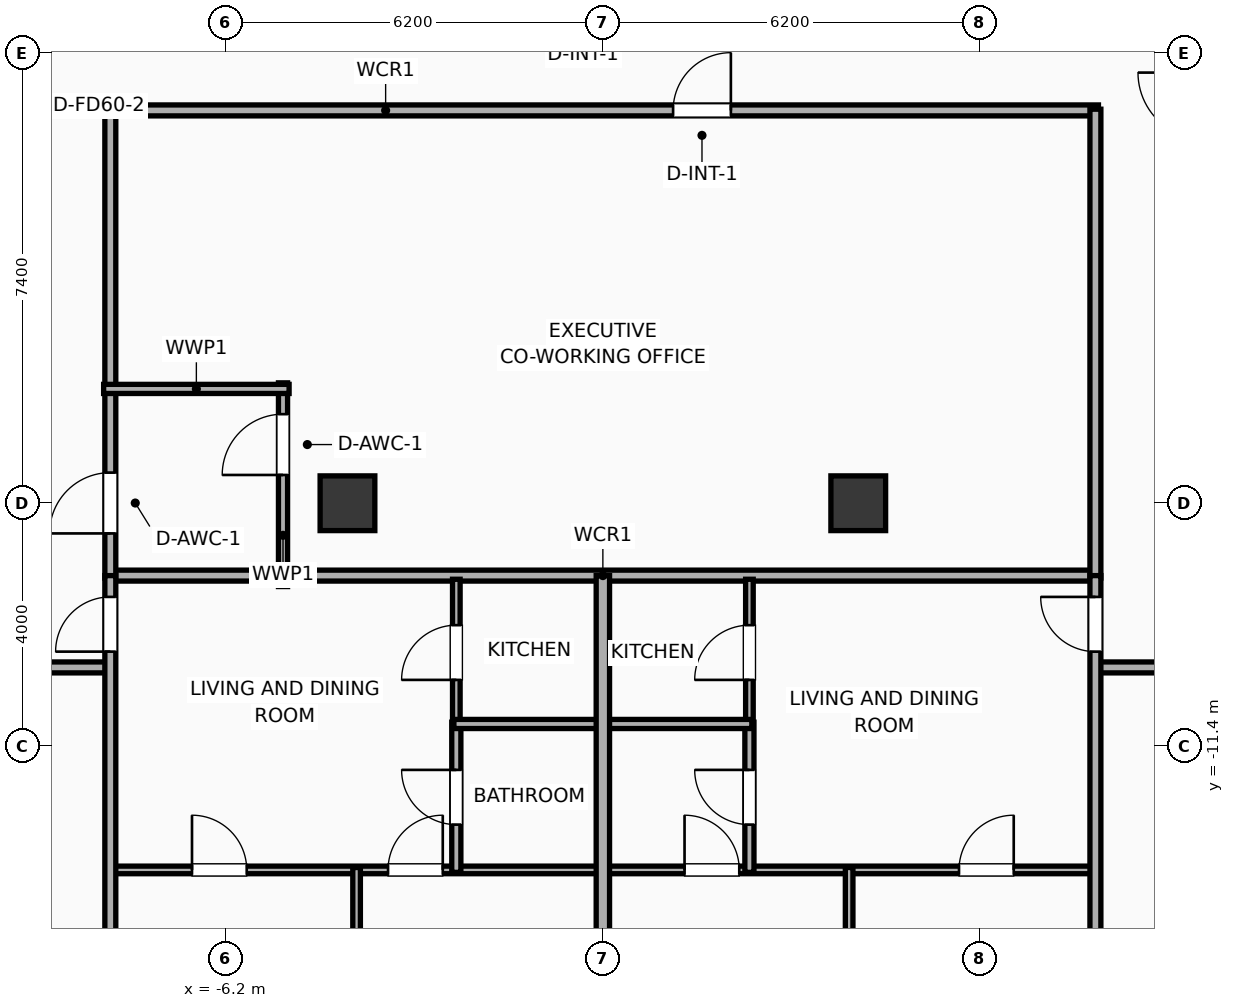
"""IFC4 building model, lengths in metres.
Left out: names, types, materials, properties, quantities, classifications, styles, units other than length and angle.
Written with IfcOpenShell. Run it as: python <this file> out.ifc"""

import sys

from ifc_helpers import new_model, si_unit, direction, frame, frame_2d, origin, origin_2d, place, context, subcontext, project, spatial, rectangle, extrude, element, fill, save


model = new_model("IFC4")
c1 = context("Model", 3, precision=1e-05, world=origin(), true_north=direction((0.0, 1.0)))
c2 = subcontext(c1, "Body", "Model", "MODEL_VIEW")
j1 = project(units=[si_unit("LENGTHUNIT", "METRE"), si_unit("PLANEANGLEUNIT", "RADIAN")], contexts=[c1])
p1 = place(None, origin())
s1 = spatial("IfcSite", under=j1, at=p1, CompositionType="ELEMENT")
p2 = place(p1, origin())
s2 = spatial("IfcBuilding", under=s1, at=p2, CompositionType="ELEMENT")
p3 = place(p2, frame((0.0, 0.0, 167.7)))
s3 = spatial("IfcBuildingStorey", under=s2, at=p3, CompositionType="ELEMENT", Elevation=167.7)
for number, where, z_axis, x_axis in (
    (1, (-4.2, -7.4, 0.0), (0.0, 0.0, 1.0), (1.0, 0.0, 0.0)),
    (2, (4.2, -7.4, 0.0), (0.0, 0.0, 1.0), (1.0, 0.0, 0.0)),
):
    element("IfcColumn", number, at=place(p3, frame(where, z_axis=z_axis, x_axis=x_axis)), inside=s3, PredefinedType="COLUMN", context=c2, shape_type="SweptSolid", body=[
        extrude(rectangle(XDim=0.9, YDim=0.9, at=origin_2d()), origin(), (0.0, 0.0, 1.0), 3.9),
    ])
p4 = place(p3, frame((-8.15, -8.59, 0.0), z_axis=(0.0, 0.0, 1.0), x_axis=(1.0, 0.0, 0.0)))
e3 = element("IfcWall", 3, at=p4, inside=s3, PredefinedType="PARTITIONING", context=c2, shape_type="SweptSolid", body=[
    extrude(rectangle(XDim=16.3, YDim=0.18, at=frame_2d((8.15, 0.0))), origin(), (0.0, 0.0, 1.0), 3.65),
])
p5 = place(p3, frame((-8.15, -0.94, 0.0), z_axis=(0.0, 0.0, 1.0), x_axis=(1.0, 0.0, 0.0)))
e4 = element("IfcWall", 4, at=p5, inside=s3, PredefinedType="PARTITIONING", context=c2, shape_type="SweptSolid", body=[
    extrude(rectangle(XDim=16.3, YDim=0.18, at=frame_2d((8.15, 0.0))), origin(), (0.0, 0.0, 1.0), 3.65),
])
p6 = place(p5, frame((9.305, 0.0, 0.0)))
e5 = element("IfcOpeningElement", 5, at=p6, cuts=e4, PredefinedType="OPENING", context=c2, shape_type="SweptSolid", body=[
    extrude(rectangle(XDim=0.95, YDim=2.05, at=frame_2d((0.475, 1.025))), frame((0.0, 0.1, 0.0), z_axis=(0.0, -1.0, 0.0), x_axis=(1.0, 0.0, 0.0)), (0.0, 0.0, 1.0), 0.2),
])
p7 = place(p3, frame((-8.1, -8.63, 0.0), z_axis=(0.0, 0.0, 1.0), x_axis=(0.0, 1.0, 0.0)))
e6 = element("IfcWall", 6, at=p7, inside=s3, PredefinedType="PARTITIONING", context=c2, shape_type="SweptSolid", body=[
    extrude(rectangle(XDim=7.71, YDim=0.18, at=frame_2d((3.855, 0.0))), origin(), (0.0, 0.0, 1.0), 3.65),
])
p8 = place(p7, frame((0.734, 0.0, 0.0)))
e7 = element("IfcOpeningElement", 7, at=p8, cuts=e6, PredefinedType="OPENING", context=c2, shape_type="SweptSolid", body=[
    extrude(rectangle(XDim=1.0, YDim=2.05, at=frame_2d((0.5, 1.025))), frame((0.0, 0.1, 0.0), z_axis=(0.0, -1.0, 0.0), x_axis=(1.0, 0.0, 0.0)), (0.0, 0.0, 1.0), 0.2),
])
p9 = place(p3, frame((8.1, -8.63, 0.0), z_axis=(0.0, 0.0, 1.0), x_axis=(0.0, 1.0, 0.0)))
e8 = element("IfcWall", 8, at=p9, inside=s3, PredefinedType="PARTITIONING", context=c2, shape_type="SweptSolid", body=[
    extrude(rectangle(XDim=7.71, YDim=0.18, at=frame_2d((3.855, 0.0))), origin(), (0.0, 0.0, 1.0), 3.65),
])
p10 = place(p3, frame((-5.26, -8.77, 0.0), z_axis=(0.0, 0.0, 1.0), x_axis=(0.0, 1.0, 0.0)))
e9 = element("IfcWall", 9, at=p10, inside=s3, PredefinedType="PLUMBINGWALL", context=c2, shape_type="SweptSolid", body=[
    extrude(rectangle(XDim=3.35, YDim=0.15, at=frame_2d((1.675, 0.0))), origin(), (0.0, 0.0, 1.0), 3.65),
])
p11 = place(p10, frame((1.835, 0.0, 0.0)))
e10 = element("IfcOpeningElement", 10, at=p11, cuts=e9, PredefinedType="OPENING", context=c2, shape_type="SweptSolid", body=[
    extrude(rectangle(XDim=1.0, YDim=2.05, at=frame_2d((0.5, 1.025))), frame((0.0, 0.085, 0.0), z_axis=(0.0, -1.0, 0.0), x_axis=(1.0, 0.0, 0.0)), (0.0, 0.0, 1.0), 0.17),
])
p12 = place(p3, frame((-8.21, -5.52, 0.0), z_axis=(0.0, 0.0, 1.0), x_axis=(1.0, 0.0, 0.0)))
e11 = element("IfcWall", 11, at=p12, inside=s3, PredefinedType="PLUMBINGWALL", context=c2, shape_type="SweptSolid", body=[
    extrude(rectangle(XDim=3.05, YDim=0.15, at=frame_2d((1.525, 0.0))), origin(), (0.0, 0.0, 1.0), 3.65),
])
p13 = place(p3, frame((-19.5, -10.1, 0.0), z_axis=(0.0, 0.0, 1.0), x_axis=(1.0, 0.0, 0.0)))
e12 = element("IfcWall", 12, at=p13, inside=s3, PredefinedType="PARTITIONING", context=c2, shape_type="SweptSolid", body=[
    extrude(rectangle(XDim=11.42, YDim=0.18, at=frame_2d((5.71, 0.0))), origin(), (0.0, 0.0, 1.0), 3.65),
])
p14 = place(p13, frame((2.623, 0.0, 0.0)))
e13 = element("IfcOpeningElement", 13, at=p14, cuts=e12, PredefinedType="OPENING", context=c2, shape_type="SweptSolid", body=[
    extrude(rectangle(XDim=0.9, YDim=2.05, at=frame_2d((0.45, 1.025))), frame((0.0, 0.1, 0.0), z_axis=(0.0, -1.0, 0.0), x_axis=(1.0, 0.0, 0.0)), (0.0, 0.0, 1.0), 0.2),
])
p15 = place(p13, frame((9.189, 0.0, 0.0)))
e14 = element("IfcOpeningElement", 14, at=p15, cuts=e12, PredefinedType="OPENING", context=c2, shape_type="SweptSolid", body=[
    extrude(rectangle(XDim=1.15, YDim=2.05, at=frame_2d((0.575, 1.025))), frame((0.0, 0.1, 0.0), z_axis=(0.0, -1.0, 0.0), x_axis=(1.0, 0.0, 0.0)), (0.0, 0.0, 1.0), 0.2),
])
p16 = place(p3, frame((8.08, -10.1, 0.0), z_axis=(0.0, 0.0, 1.0), x_axis=(1.0, 0.0, 0.0)))
e15 = element("IfcWall", 15, at=p16, inside=s3, PredefinedType="PARTITIONING", context=c2, shape_type="SweptSolid", body=[
    extrude(rectangle(XDim=11.42, YDim=0.18, at=frame_2d((5.71, 0.0))), origin(), (0.0, 0.0, 1.0), 3.65),
])
p17 = place(p16, frame((1.175, 0.0, 0.0)))
e16 = element("IfcOpeningElement", 16, at=p17, cuts=e15, PredefinedType="OPENING", context=c2, shape_type="SweptSolid", body=[
    extrude(rectangle(XDim=1.15, YDim=2.05, at=frame_2d((0.575, 1.025))), frame((0.0, 0.1, 0.0), z_axis=(0.0, -1.0, 0.0), x_axis=(1.0, 0.0, 0.0)), (0.0, 0.0, 1.0), 0.2),
])
p18 = place(p16, frame((6.87, 0.0, 0.0)))
e17 = element("IfcOpeningElement", 17, at=p18, cuts=e15, PredefinedType="OPENING", context=c2, shape_type="SweptSolid", body=[
    extrude(rectangle(XDim=1.15, YDim=2.05, at=frame_2d((0.575, 1.025))), frame((0.0, 0.1, 0.0), z_axis=(0.0, -1.0, 0.0), x_axis=(1.0, 0.0, 0.0)), (0.0, 0.0, 1.0), 0.2),
])
p19 = place(p3, frame((-8.08, -13.43, 0.0), z_axis=(0.0, 0.0, 1.0), x_axis=(1.0, 0.0, 0.0)))
e18 = element("IfcWall", 18, at=p19, inside=s3, PredefinedType="PARTITIONING", context=c2, shape_type="SweptSolid", body=[
    extrude(rectangle(XDim=8.06, YDim=0.125, at=frame_2d((4.03, 0.0))), origin(), (0.0, 0.0, 1.0), 3.65),
])
p20 = place(p19, frame((1.323, 0.0, 0.0)))
e19 = element("IfcOpeningElement", 19, at=p20, cuts=e18, PredefinedType="OPENING", context=c2, shape_type="SweptSolid", body=[
    extrude(rectangle(XDim=0.9, YDim=2.05, at=frame_2d((0.45, 1.025))), frame((0.0, 0.073, 0.0), z_axis=(0.0, -1.0, 0.0), x_axis=(1.0, 0.0, 0.0)), (0.0, 0.0, 1.0), 0.145),
])
p21 = place(p19, frame((4.547, 0.0, 0.0)))
e20 = element("IfcOpeningElement", 20, at=p21, cuts=e18, PredefinedType="OPENING", context=c2, shape_type="SweptSolid", body=[
    extrude(rectangle(XDim=0.9, YDim=2.05, at=frame_2d((0.45, 1.025))), frame((0.0, 0.073, 0.0), z_axis=(0.0, -1.0, 0.0), x_axis=(1.0, 0.0, 0.0)), (0.0, 0.0, 1.0), 0.145),
])
p22 = place(p3, frame((-2.41, -11.06, 0.0), z_axis=(0.0, 0.0, 1.0), x_axis=(0.0, 1.0, 0.0)))
e21 = element("IfcWall", 21, at=p22, inside=s3, PredefinedType="PARTITIONING", context=c2, shape_type="SweptSolid", body=[
    extrude(rectangle(XDim=2.41, YDim=0.125, at=frame_2d((1.205, 0.0))), origin(), (0.0, 0.0, 1.0), 3.65),
])
p23 = place(p22, frame((0.755, 0.0, 0.0)))
e22 = element("IfcOpeningElement", 22, at=p23, cuts=e21, PredefinedType="OPENING", context=c2, shape_type="SweptSolid", body=[
    extrude(rectangle(XDim=0.9, YDim=2.05, at=frame_2d((0.45, 1.025))), frame((0.0, 0.073, 0.0), z_axis=(0.0, -1.0, 0.0), x_axis=(1.0, 0.0, 0.0)), (0.0, 0.0, 1.0), 0.145),
])
p24 = place(p3, frame((-2.41, -13.47, 0.0), z_axis=(0.0, 0.0, 1.0), x_axis=(0.0, 1.0, 0.0)))
e23 = element("IfcWall", 23, at=p24, inside=s3, PredefinedType="PLUMBINGWALL", context=c2, shape_type="SweptSolid", body=[
    extrude(rectangle(XDim=2.47, YDim=0.15, at=frame_2d((1.235, 0.0))), origin(), (0.0, 0.0, 1.0), 3.65),
])
p25 = place(p24, frame((0.785, 0.0, 0.0)))
e24 = element("IfcOpeningElement", 24, at=p25, cuts=e23, PredefinedType="OPENING", context=c2, shape_type="SweptSolid", body=[
    extrude(rectangle(XDim=0.9, YDim=2.05, at=frame_2d((0.45, 1.025))), frame((0.0, 0.085, 0.0), z_axis=(0.0, -1.0, 0.0), x_axis=(1.0, 0.0, 0.0)), (0.0, 0.0, 1.0), 0.17),
])
p26 = place(p3, frame((-2.45, -11.03, 0.0), z_axis=(0.0, 0.0, 1.0), x_axis=(1.0, 0.0, 0.0)))
e25 = element("IfcWall", 25, at=p26, inside=s3, PredefinedType="PLUMBINGWALL", context=c2, shape_type="SweptSolid", body=[
    extrude(rectangle(XDim=2.43, YDim=0.15, at=frame_2d((1.215, 0.0))), origin(), (0.0, 0.0, 1.0), 3.65),
])
p27 = place(p3, frame((-4.05, -21.031, 0.0), z_axis=(0.0, 0.0, 1.0), x_axis=(0.0, 1.0, 0.0)))
e26 = element("IfcWall", 26, at=p27, inside=s3, PredefinedType="PARTITIONING", context=c2, shape_type="SweptSolid", body=[
    extrude(rectangle(XDim=7.641, YDim=0.125, at=frame_2d((3.82, 0.0))), origin(), (0.0, 0.0, 1.0), 3.65),
])
p28 = place(p3, frame((-8.1, -21.456, 0.0), z_axis=(0.0, 0.0, 1.0), x_axis=(0.0, 1.0, 0.0)))
e27 = element("IfcWall", 27, at=p28, inside=s3, PredefinedType="PARTITIONING", context=c2, shape_type="SweptSolid", body=[
    extrude(rectangle(XDim=12.866, YDim=0.18, at=frame_2d((6.433, 0.0))), origin(), (0.0, 0.0, 1.0), 3.65),
])
p29 = place(p28, frame((11.616, 0.0, 0.0)))
e28 = element("IfcOpeningElement", 28, at=p29, cuts=e27, PredefinedType="OPENING", context=c2, shape_type="SweptSolid", body=[
    extrude(rectangle(XDim=0.9, YDim=2.05, at=frame_2d((0.45, 1.025))), frame((0.0, 0.1, 0.0), z_axis=(0.0, -1.0, 0.0), x_axis=(1.0, 0.0, 0.0)), (0.0, 0.0, 1.0), 0.2),
])
p30 = place(p3, frame((0.02, -13.43, 0.0), z_axis=(0.0, 0.0, 1.0), x_axis=(1.0, 0.0, 0.0)))
e29 = element("IfcWall", 29, at=p30, inside=s3, PredefinedType="PARTITIONING", context=c2, shape_type="SweptSolid", body=[
    extrude(rectangle(XDim=8.06, YDim=0.125, at=frame_2d((4.03, 0.0))), origin(), (0.0, 0.0, 1.0), 3.65),
])
p31 = place(p30, frame((1.323, 0.0, 0.0)))
e30 = element("IfcOpeningElement", 30, at=p31, cuts=e29, PredefinedType="OPENING", context=c2, shape_type="SweptSolid", body=[
    extrude(rectangle(XDim=0.9, YDim=2.05, at=frame_2d((0.45, 1.025))), frame((0.0, 0.073, 0.0), z_axis=(0.0, -1.0, 0.0), x_axis=(1.0, 0.0, 0.0)), (0.0, 0.0, 1.0), 0.145),
])
p32 = place(p30, frame((5.837, 0.0, 0.0)))
e31 = element("IfcOpeningElement", 31, at=p32, cuts=e29, PredefinedType="OPENING", context=c2, shape_type="SweptSolid", body=[
    extrude(rectangle(XDim=0.9, YDim=2.05, at=frame_2d((0.45, 1.025))), frame((0.0, 0.073, 0.0), z_axis=(0.0, -1.0, 0.0), x_axis=(1.0, 0.0, 0.0)), (0.0, 0.0, 1.0), 0.145),
])
p33 = place(p3, frame((2.41, -11.06, 0.0), z_axis=(0.0, 0.0, 1.0), x_axis=(0.0, 1.0, 0.0)))
e32 = element("IfcWall", 32, at=p33, inside=s3, PredefinedType="PARTITIONING", context=c2, shape_type="SweptSolid", body=[
    extrude(rectangle(XDim=2.41, YDim=0.125, at=frame_2d((1.205, 0.0))), origin(), (0.0, 0.0, 1.0), 3.65),
])
p34 = place(p33, frame((0.755, 0.0, 0.0)))
e33 = element("IfcOpeningElement", 33, at=p34, cuts=e32, PredefinedType="OPENING", context=c2, shape_type="SweptSolid", body=[
    extrude(rectangle(XDim=0.9, YDim=2.05, at=frame_2d((0.45, 1.025))), frame((0.0, 0.073, 0.0), z_axis=(0.0, -1.0, 0.0), x_axis=(1.0, 0.0, 0.0)), (0.0, 0.0, 1.0), 0.145),
])
p35 = place(p3, frame((2.41, -13.47, 0.0), z_axis=(0.0, 0.0, 1.0), x_axis=(0.0, 1.0, 0.0)))
e34 = element("IfcWall", 34, at=p35, inside=s3, PredefinedType="PLUMBINGWALL", context=c2, shape_type="SweptSolid", body=[
    extrude(rectangle(XDim=2.47, YDim=0.15, at=frame_2d((1.235, 0.0))), origin(), (0.0, 0.0, 1.0), 3.65),
])
p36 = place(p35, frame((0.785, 0.0, 0.0)))
e35 = element("IfcOpeningElement", 35, at=p36, cuts=e34, PredefinedType="OPENING", context=c2, shape_type="SweptSolid", body=[
    extrude(rectangle(XDim=0.9, YDim=2.05, at=frame_2d((0.45, 1.025))), frame((0.0, 0.085, 0.0), z_axis=(0.0, -1.0, 0.0), x_axis=(1.0, 0.0, 0.0)), (0.0, 0.0, 1.0), 0.17),
])
p37 = place(p3, frame((0.02, -11.03, 0.0), z_axis=(0.0, 0.0, 1.0), x_axis=(1.0, 0.0, 0.0)))
e36 = element("IfcWall", 36, at=p37, inside=s3, PredefinedType="PLUMBINGWALL", context=c2, shape_type="SweptSolid", body=[
    extrude(rectangle(XDim=2.43, YDim=0.15, at=frame_2d((1.215, 0.0))), origin(), (0.0, 0.0, 1.0), 3.65),
])
p38 = place(p3, frame((4.05, -20.179, 0.0), z_axis=(0.0, 0.0, 1.0), x_axis=(0.0, 1.0, 0.0)))
e37 = element("IfcWall", 37, at=p38, inside=s3, PredefinedType="PARTITIONING", context=c2, shape_type="SweptSolid", body=[
    extrude(rectangle(XDim=6.79, YDim=0.125, at=frame_2d((3.395, 0.0))), origin(), (0.0, 0.0, 1.0), 3.04),
])
p39 = place(p3, frame((8.1, -19.754, 0.0), z_axis=(0.0, 0.0, 1.0), x_axis=(0.0, 1.0, 0.0)))
e38 = element("IfcWall", 38, at=p39, inside=s3, PredefinedType="PARTITIONING", context=c2, shape_type="SweptSolid", body=[
    extrude(rectangle(XDim=11.164, YDim=0.18, at=frame_2d((5.582, 0.0))), origin(), (0.0, 0.0, 1.0), 3.65),
])
p40 = place(p39, frame((9.913, 0.0, 0.0)))
e39 = element("IfcOpeningElement", 39, at=p40, cuts=e38, PredefinedType="OPENING", context=c2, shape_type="SweptSolid", body=[
    extrude(rectangle(XDim=0.9, YDim=2.05, at=frame_2d((0.45, 1.025))), frame((0.0, 0.1, 0.0), z_axis=(0.0, -1.0, 0.0), x_axis=(1.0, 0.0, 0.0)), (0.0, 0.0, 1.0), 0.2),
])
p41 = place(p3, frame((0.0, -20.605, 0.0), z_axis=(0.0, 0.0, 1.0), x_axis=(0.0, 1.0, 0.0)))
e40 = element("IfcWall", 40, at=p41, inside=s3, PredefinedType="PARTITIONING", context=c2, shape_type="SweptSolid", body=[
    extrude(rectangle(XDim=12.015, YDim=0.22, at=frame_2d((6.007, 0.0))), origin(), (0.0, 0.0, 1.0), 3.65),
])
p42 = place(p6, origin())
e41 = element("IfcDoor", 41, at=p42, inside=s3, OperationType="SINGLE_SWING_RIGHT", PredefinedType="DOOR", context=c2, shape_type="SweptSolid", body=[
    extrude(rectangle(XDim=0.95, YDim=2.05, at=frame_2d((0.475, 1.025))), frame((0.0, 0.025, 0.0), z_axis=(0.0, -1.0, 0.0), x_axis=(1.0, 0.0, 0.0)), (0.0, 0.0, 1.0), 0.05),
])
fill(e5, e41)
p43 = place(p8, origin())
e42 = element("IfcDoor", 42, at=p43, inside=s3, OperationType="SINGLE_SWING_LEFT", PredefinedType="DOOR", context=c2, shape_type="SweptSolid", body=[
    extrude(rectangle(XDim=1.0, YDim=2.05, at=frame_2d((0.5, 1.025))), frame((0.0, 0.025, 0.0), z_axis=(0.0, -1.0, 0.0), x_axis=(1.0, 0.0, 0.0)), (0.0, 0.0, 1.0), 0.05),
])
fill(e7, e42)
p44 = place(p11, origin())
e43 = element("IfcDoor", 43, at=p44, inside=s3, OperationType="SINGLE_SWING_LEFT", PredefinedType="DOOR", context=c2, shape_type="SweptSolid", body=[
    extrude(rectangle(XDim=1.0, YDim=2.05, at=frame_2d((0.5, 1.025))), frame((0.0, 0.025, 0.0), z_axis=(0.0, -1.0, 0.0), x_axis=(1.0, 0.0, 0.0)), (0.0, 0.0, 1.0), 0.05),
])
fill(e10, e43)
p45 = place(p20, origin())
e44 = element("IfcDoor", 44, at=p45, inside=s3, OperationType="SINGLE_SWING_LEFT", PredefinedType="DOOR", context=c2, shape_type="SweptSolid", body=[
    extrude(rectangle(XDim=0.9, YDim=2.05, at=frame_2d((0.45, 1.025))), frame((0.0, 0.025, 0.0), z_axis=(0.0, -1.0, 0.0), x_axis=(1.0, 0.0, 0.0)), (0.0, 0.0, 1.0), 0.05),
])
fill(e19, e44)
p46 = place(p21, origin())
e45 = element("IfcDoor", 45, at=p46, inside=s3, OperationType="SINGLE_SWING_RIGHT", PredefinedType="DOOR", context=c2, shape_type="SweptSolid", body=[
    extrude(rectangle(XDim=0.9, YDim=2.05, at=frame_2d((0.45, 1.025))), frame((0.0, 0.025, 0.0), z_axis=(0.0, -1.0, 0.0), x_axis=(1.0, 0.0, 0.0)), (0.0, 0.0, 1.0), 0.05),
])
fill(e20, e45)
p47 = place(p23, origin())
e46 = element("IfcDoor", 46, at=p47, inside=s3, OperationType="SINGLE_SWING_LEFT", PredefinedType="DOOR", context=c2, shape_type="SweptSolid", body=[
    extrude(rectangle(XDim=0.9, YDim=2.05, at=frame_2d((0.45, 1.025))), frame((0.0, 0.025, 0.0), z_axis=(0.0, -1.0, 0.0), x_axis=(1.0, 0.0, 0.0)), (0.0, 0.0, 1.0), 0.05),
])
fill(e22, e46)
p48 = place(p25, origin())
e47 = element("IfcDoor", 47, at=p48, inside=s3, OperationType="SINGLE_SWING_RIGHT", PredefinedType="DOOR", context=c2, shape_type="SweptSolid", body=[
    extrude(rectangle(XDim=0.9, YDim=2.05, at=frame_2d((0.45, 1.025))), frame((0.0, 0.025, 0.0), z_axis=(0.0, -1.0, 0.0), x_axis=(1.0, 0.0, 0.0)), (0.0, 0.0, 1.0), 0.05),
])
fill(e24, e47)
p49 = place(p29, origin())
e48 = element("IfcDoor", 48, at=p49, inside=s3, OperationType="SINGLE_SWING_LEFT", PredefinedType="DOOR", context=c2, shape_type="SweptSolid", body=[
    extrude(rectangle(XDim=0.9, YDim=2.05, at=frame_2d((0.45, 1.025))), frame((0.0, 0.025, 0.0), z_axis=(0.0, -1.0, 0.0), x_axis=(1.0, 0.0, 0.0)), (0.0, 0.0, 1.0), 0.05),
])
fill(e28, e48)
p50 = place(p31, origin())
e49 = element("IfcDoor", 49, at=p50, inside=s3, OperationType="SINGLE_SWING_LEFT", PredefinedType="DOOR", context=c2, shape_type="SweptSolid", body=[
    extrude(rectangle(XDim=0.9, YDim=2.05, at=frame_2d((0.45, 1.025))), frame((0.0, 0.025, 0.0), z_axis=(0.0, -1.0, 0.0), x_axis=(1.0, 0.0, 0.0)), (0.0, 0.0, 1.0), 0.05),
])
fill(e30, e49)
p51 = place(p32, origin())
e50 = element("IfcDoor", 50, at=p51, inside=s3, OperationType="SINGLE_SWING_RIGHT", PredefinedType="DOOR", context=c2, shape_type="SweptSolid", body=[
    extrude(rectangle(XDim=0.9, YDim=2.05, at=frame_2d((0.45, 1.025))), frame((0.0, 0.025, 0.0), z_axis=(0.0, -1.0, 0.0), x_axis=(1.0, 0.0, 0.0)), (0.0, 0.0, 1.0), 0.05),
])
fill(e31, e50)
p52 = place(p34, origin())
e51 = element("IfcDoor", 51, at=p52, inside=s3, OperationType="SINGLE_SWING_LEFT", PredefinedType="DOOR", context=c2, shape_type="SweptSolid", body=[
    extrude(rectangle(XDim=0.9, YDim=2.05, at=frame_2d((0.45, 1.025))), frame((0.0, 0.025, 0.0), z_axis=(0.0, -1.0, 0.0), x_axis=(1.0, 0.0, 0.0)), (0.0, 0.0, 1.0), 0.05),
])
fill(e33, e51)
p53 = place(p36, origin())
e52 = element("IfcDoor", 52, at=p53, inside=s3, OperationType="SINGLE_SWING_RIGHT", PredefinedType="DOOR", context=c2, shape_type="SweptSolid", body=[
    extrude(rectangle(XDim=0.9, YDim=2.05, at=frame_2d((0.45, 1.025))), frame((0.0, 0.025, 0.0), z_axis=(0.0, -1.0, 0.0), x_axis=(1.0, 0.0, 0.0)), (0.0, 0.0, 1.0), 0.05),
])
fill(e35, e52)
p54 = place(p40, origin())
e53 = element("IfcDoor", 53, at=p54, inside=s3, OperationType="SINGLE_SWING_RIGHT", PredefinedType="DOOR", context=c2, shape_type="SweptSolid", body=[
    extrude(rectangle(XDim=0.9, YDim=2.05, at=frame_2d((0.45, 1.025))), frame((0.0, 0.025, 0.0), z_axis=(0.0, -1.0, 0.0), x_axis=(1.0, 0.0, 0.0)), (0.0, 0.0, 1.0), 0.05),
])
fill(e39, e53)
save(model, sys.argv[1])
